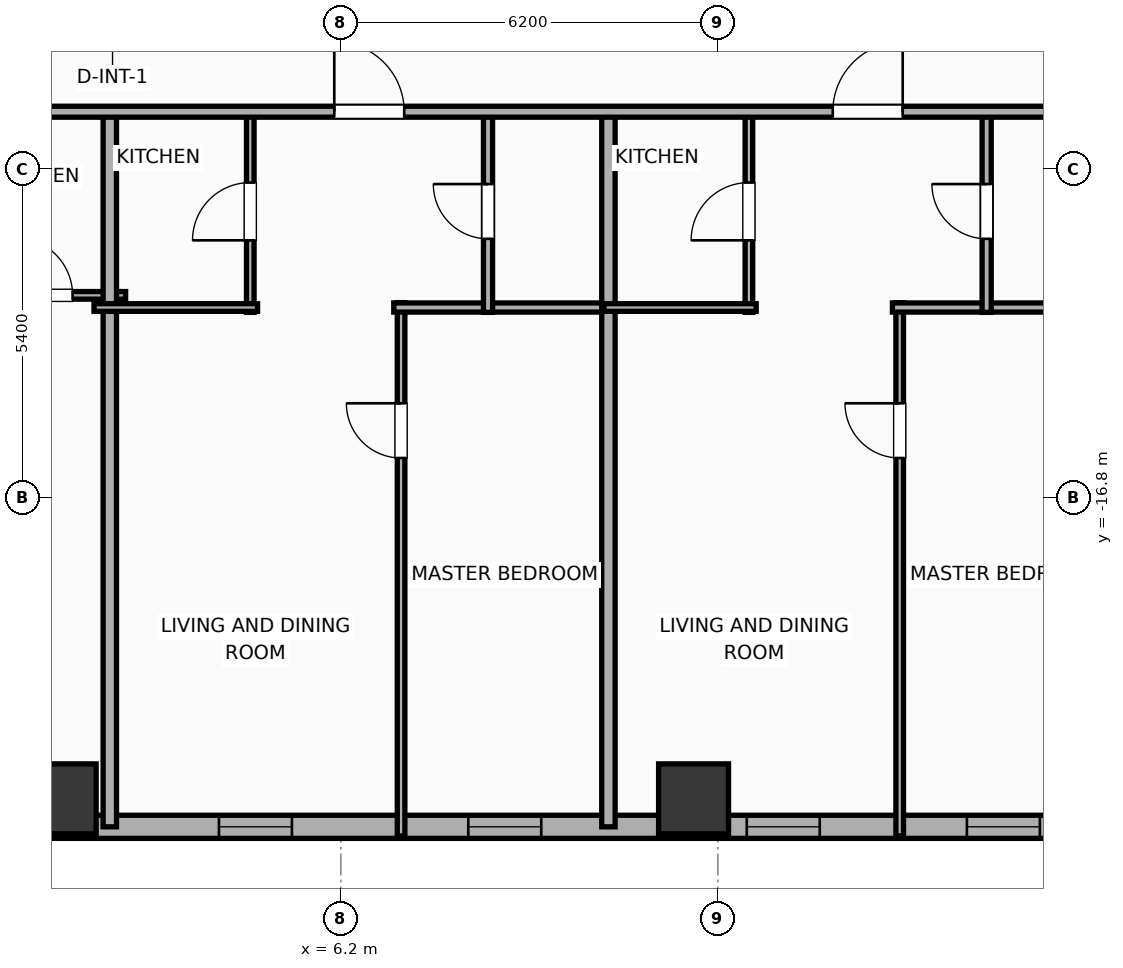
"""IFC4 building model, lengths in metres.
Left out: names, types, materials, properties, quantities, classifications, styles, units other than length and angle.
Written with IfcOpenShell. Run it as: python <this file> out.ifc"""

import sys

from ifc_helpers import new_model, si_unit, direction, frame, frame_2d, origin, origin_2d, place, context, subcontext, project, spatial, rectangle, hollow_rectangle, extrude, element, fill, save


model = new_model("IFC4")
c1 = context("Model", 3, precision=1e-05, world=origin(), true_north=direction((0.0, 1.0)))
c2 = subcontext(c1, "Body", "Model", "MODEL_VIEW")
j1 = project(units=[si_unit("LENGTHUNIT", "METRE"), si_unit("PLANEANGLEUNIT", "RADIAN")], contexts=[c1])
p1 = place(None, origin())
s1 = spatial("IfcSite", under=j1, at=p1, CompositionType="ELEMENT")
p2 = place(p1, origin())
s2 = spatial("IfcBuilding", under=s1, at=p2, CompositionType="ELEMENT")
p3 = place(p2, frame((0.0, 0.0, 72.8)))
s3 = spatial("IfcBuildingStorey", under=s2, at=p3, CompositionType="ELEMENT", Elevation=72.8)
for number, where, z_axis, x_axis in (
    (1, (1.6, -21.75, 0.0), (0.0, 0.0, 1.0), (1.0, 0.0, 0.0)),
    (2, (12.0, -21.75, 0.0), (0.0, 0.0, 1.0), (1.0, 0.0, 0.0)),
):
    element("IfcColumn", number, at=place(p3, frame(where, z_axis=z_axis, x_axis=x_axis)), inside=s3, PredefinedType="COLUMN", context=c2, shape_type="SweptSolid", body=[
        extrude(hollow_rectangle(XDim=1.15, YDim=1.15, WallThickness=0.04, at=origin_2d()), origin(), (0.0, 0.0, 1.0), 3.9),
    ])
p4 = place(p3, frame((22.381, -22.21, 0.0), z_axis=(0.0, 0.0, 1.0), x_axis=(-1.0, 0.0, 0.0)))
e3 = element("IfcWall", 3, at=p4, inside=s3, PredefinedType="ELEMENTEDWALL", context=c2, shape_type="SweptSolid", body=[
    extrude(rectangle(XDim=51.963, YDim=0.38, at=frame_2d((25.981, 0.0))), origin(), (0.0, 0.0, 1.0), 3.65),
])
p5 = place(p4, frame((50.372, 0.0, 0.75)))
e4 = element("IfcOpeningElement", 4, at=p5, cuts=e3, PredefinedType="OPENING", context=c2, shape_type="SweptSolid", body=[
    extrude(rectangle(XDim=0.52, YDim=2.05, at=frame_2d((0.26, 1.025))), frame((0.0, 0.2, 0.0), z_axis=(0.0, -1.0, 0.0), x_axis=(1.0, 0.0, 0.0)), (0.0, 0.0, 1.0), 0.4),
])
p6 = place(p4, frame((45.681, 0.0, 0.75)))
e5 = element("IfcOpeningElement", 5, at=p6, cuts=e3, PredefinedType="OPENING", context=c2, shape_type="SweptSolid", body=[
    extrude(rectangle(XDim=1.2, YDim=2.05, at=frame_2d((0.6, 1.025))), frame((0.0, 0.2, 0.0), z_axis=(0.0, -1.0, 0.0), x_axis=(1.0, 0.0, 0.0)), (0.0, 0.0, 1.0), 0.4),
])
p7 = place(p4, frame((48.485, 0.0, 0.75)))
e6 = element("IfcOpeningElement", 6, at=p7, cuts=e3, PredefinedType="OPENING", context=c2, shape_type="SweptSolid", body=[
    extrude(rectangle(XDim=1.2, YDim=2.05, at=frame_2d((0.6, 1.025))), frame((0.0, 0.2, 0.0), z_axis=(0.0, -1.0, 0.0), x_axis=(1.0, 0.0, 0.0)), (0.0, 0.0, 1.0), 0.4),
])
p8 = place(p4, frame((42.426, 0.0, 0.75)))
e7 = element("IfcOpeningElement", 7, at=p8, cuts=e3, PredefinedType="OPENING", context=c2, shape_type="SweptSolid", body=[
    extrude(rectangle(XDim=1.2, YDim=2.05, at=frame_2d((0.6, 1.025))), frame((0.0, 0.2, 0.0), z_axis=(0.0, -1.0, 0.0), x_axis=(1.0, 0.0, 0.0)), (0.0, 0.0, 1.0), 0.4),
])
p9 = place(p4, frame((37.486, 0.0, 0.75)))
e8 = element("IfcOpeningElement", 8, at=p9, cuts=e3, PredefinedType="OPENING", context=c2, shape_type="SweptSolid", body=[
    extrude(rectangle(XDim=1.2, YDim=2.05, at=frame_2d((0.6, 1.025))), frame((0.0, 0.2, 0.0), z_axis=(0.0, -1.0, 0.0), x_axis=(1.0, 0.0, 0.0)), (0.0, 0.0, 1.0), 0.4),
])
p10 = place(p4, frame((33.386, 0.0, 0.75)))
e9 = element("IfcOpeningElement", 9, at=p10, cuts=e3, PredefinedType="OPENING", context=c2, shape_type="SweptSolid", body=[
    extrude(rectangle(XDim=1.2, YDim=2.05, at=frame_2d((0.6, 1.025))), frame((0.0, 0.2, 0.0), z_axis=(0.0, -1.0, 0.0), x_axis=(1.0, 0.0, 0.0)), (0.0, 0.0, 1.0), 0.4),
])
p11 = place(p4, frame((29.166, 0.0, 0.75)))
e10 = element("IfcOpeningElement", 10, at=p11, cuts=e3, PredefinedType="OPENING", context=c2, shape_type="SweptSolid", body=[
    extrude(rectangle(XDim=1.2, YDim=2.05, at=frame_2d((0.6, 1.025))), frame((0.0, 0.2, 0.0), z_axis=(0.0, -1.0, 0.0), x_axis=(1.0, 0.0, 0.0)), (0.0, 0.0, 1.0), 0.4),
])
p12 = place(p4, frame((26.081, 0.0, 0.75)))
e11 = element("IfcOpeningElement", 11, at=p12, cuts=e3, PredefinedType="OPENING", context=c2, shape_type="SweptSolid", body=[
    extrude(rectangle(XDim=1.2, YDim=2.05, at=frame_2d((0.6, 1.025))), frame((0.0, 0.2, 0.0), z_axis=(0.0, -1.0, 0.0), x_axis=(1.0, 0.0, 0.0)), (0.0, 0.0, 1.0), 0.4),
])
p13 = place(p4, frame((21.981, 0.0, 0.75)))
e12 = element("IfcOpeningElement", 12, at=p13, cuts=e3, PredefinedType="OPENING", context=c2, shape_type="SweptSolid", body=[
    extrude(rectangle(XDim=1.2, YDim=2.05, at=frame_2d((0.6, 1.025))), frame((0.0, 0.2, 0.0), z_axis=(0.0, -1.0, 0.0), x_axis=(1.0, 0.0, 0.0)), (0.0, 0.0, 1.0), 0.4),
])
p14 = place(p4, frame((16.986, 0.0, 0.75)))
e13 = element("IfcOpeningElement", 13, at=p14, cuts=e3, PredefinedType="OPENING", context=c2, shape_type="SweptSolid", body=[
    extrude(rectangle(XDim=1.2, YDim=2.05, at=frame_2d((0.6, 1.025))), frame((0.0, 0.2, 0.0), z_axis=(0.0, -1.0, 0.0), x_axis=(1.0, 0.0, 0.0)), (0.0, 0.0, 1.0), 0.4),
])
p15 = place(p4, frame((12.886, 0.0, 0.75)))
e14 = element("IfcOpeningElement", 14, at=p15, cuts=e3, PredefinedType="OPENING", context=c2, shape_type="SweptSolid", body=[
    extrude(rectangle(XDim=1.2, YDim=2.05, at=frame_2d((0.6, 1.025))), frame((0.0, 0.2, 0.0), z_axis=(0.0, -1.0, 0.0), x_axis=(1.0, 0.0, 0.0)), (0.0, 0.0, 1.0), 0.4),
])
p16 = place(p4, frame((8.306, 0.0, 0.75)))
e15 = element("IfcOpeningElement", 15, at=p16, cuts=e3, PredefinedType="OPENING", context=c2, shape_type="SweptSolid", body=[
    extrude(rectangle(XDim=1.2, YDim=2.05, at=frame_2d((0.6, 1.025))), frame((0.0, 0.2, 0.0), z_axis=(0.0, -1.0, 0.0), x_axis=(1.0, 0.0, 0.0)), (0.0, 0.0, 1.0), 0.4),
])
p17 = place(p4, frame((4.686, 0.0, 0.75)))
e16 = element("IfcOpeningElement", 16, at=p17, cuts=e3, PredefinedType="OPENING", context=c2, shape_type="SweptSolid", body=[
    extrude(rectangle(XDim=1.2, YDim=2.05, at=frame_2d((0.6, 1.025))), frame((0.0, 0.2, 0.0), z_axis=(0.0, -1.0, 0.0), x_axis=(1.0, 0.0, 0.0)), (0.0, 0.0, 1.0), 0.4),
])
p18 = place(p4, frame((1.635, 0.0, 0.75)))
e17 = element("IfcOpeningElement", 17, at=p18, cuts=e3, PredefinedType="OPENING", context=c2, shape_type="SweptSolid", body=[
    extrude(rectangle(XDim=1.2, YDim=2.05, at=frame_2d((0.6, 1.025))), frame((0.0, 0.2, 0.0), z_axis=(0.0, -1.0, 0.0), x_axis=(1.0, 0.0, 0.0)), (0.0, 0.0, 1.0), 0.4),
])
p19 = place(p3, frame((-0.033, -13.47, 0.0), z_axis=(0.0, 0.0, 1.0), x_axis=(1.0, 0.0, 0.0)))
e18 = element("IfcWall", 18, at=p19, inside=s3, PredefinedType="PARTITIONING", context=c2, shape_type="SweptSolid", body=[
    extrude(rectangle(XDim=2.693, YDim=0.125, at=frame_2d((1.346, 0.0))), origin(), (0.0, 0.0, 1.0), 3.65),
])
p20 = place(p19, frame((0.872, 0.0, 0.0)))
e19 = element("IfcOpeningElement", 19, at=p20, cuts=e18, PredefinedType="OPENING", context=c2, shape_type="SweptSolid", body=[
    extrude(rectangle(XDim=0.95, YDim=2.05, at=frame_2d((0.475, 1.025))), frame((0.0, 0.073, 0.0), z_axis=(0.0, -1.0, 0.0), x_axis=(1.0, 0.0, 0.0)), (0.0, 0.0, 1.0), 0.145),
])
p21 = place(p3, frame((2.4, -22.21, 0.0), z_axis=(0.0, 0.0, 1.0), x_axis=(0.0, 1.0, 0.0)))
e20 = element("IfcWall", 20, at=p21, inside=s3, PredefinedType="PARTITIONING", context=c2, shape_type="SweptSolid", body=[
    extrude(rectangle(XDim=11.84, YDim=0.22, at=frame_2d((5.92, 0.0))), origin(), (0.0, 0.0, 1.0), 2.94),
])
p22 = place(p3, frame((7.19, -22.36, 0.0), z_axis=(0.0, 0.0, 1.0), x_axis=(0.0, 1.0, 0.0)))
e21 = element("IfcWall", 21, at=p22, inside=s3, PredefinedType="PARTITIONING", context=c2, shape_type="SweptSolid", body=[
    extrude(rectangle(XDim=8.77, YDim=0.125, at=frame_2d((4.385, 0.0))), origin(), (0.0, 0.0, 1.0), 3.65),
])
p23 = place(p22, frame((6.215, 0.0, 0.0)))
e22 = element("IfcOpeningElement", 22, at=p23, cuts=e21, PredefinedType="OPENING", context=c2, shape_type="SweptSolid", body=[
    extrude(rectangle(XDim=0.9, YDim=2.05, at=frame_2d((0.45, 1.025))), frame((0.0, 0.073, 0.0), z_axis=(0.0, -1.0, 0.0), x_axis=(1.0, 0.0, 0.0)), (0.0, 0.0, 1.0), 0.145),
])
p24 = place(p3, frame((7.07, -13.67, 0.0), z_axis=(0.0, 0.0, 1.0), x_axis=(1.0, 0.0, 0.0)))
e23 = element("IfcWall", 23, at=p24, inside=s3, PredefinedType="PLUMBINGWALL", context=c2, shape_type="SweptSolid", body=[
    extrude(rectangle(XDim=3.605, YDim=0.15, at=frame_2d((1.802, 0.0))), origin(), (0.0, 0.0, 1.0), 3.65),
])
p25 = place(p3, frame((4.71, -13.75, 0.0), z_axis=(0.0, 0.0, 1.0), x_axis=(0.0, 1.0, 0.0)))
e24 = element("IfcWall", 24, at=p25, inside=s3, PredefinedType="PARTITIONING", context=c2, shape_type="SweptSolid", body=[
    extrude(rectangle(XDim=3.32, YDim=0.125, at=frame_2d((1.66, 0.0))), origin(), (0.0, 0.0, 1.0), 3.65),
])
p26 = place(p25, frame((1.185, 0.0, 0.0)))
e25 = element("IfcOpeningElement", 25, at=p26, cuts=e24, PredefinedType="OPENING", context=c2, shape_type="SweptSolid", body=[
    extrude(rectangle(XDim=0.95, YDim=2.05, at=frame_2d((0.475, 1.025))), frame((0.0, 0.073, 0.0), z_axis=(0.0, -1.0, 0.0), x_axis=(1.0, 0.0, 0.0)), (0.0, 0.0, 1.0), 0.145),
])
p27 = place(p3, frame((2.14, -13.67, 0.0), z_axis=(0.0, 0.0, 1.0), x_axis=(1.0, 0.0, 0.0)))
e26 = element("IfcWall", 26, at=p27, inside=s3, PredefinedType="PARTITIONING", context=c2, shape_type="SweptSolid", body=[
    extrude(rectangle(XDim=2.69, YDim=0.125, at=frame_2d((1.345, 0.0))), origin(), (0.0, 0.0, 1.0), 3.65),
])
p28 = place(p3, frame((8.62, -13.75, 0.0), z_axis=(0.0, 0.0, 1.0), x_axis=(0.0, 1.0, 0.0)))
e27 = element("IfcWall", 27, at=p28, inside=s3, PredefinedType="PLUMBINGWALL", context=c2, shape_type="SweptSolid", body=[
    extrude(rectangle(XDim=3.32, YDim=0.15, at=frame_2d((1.66, 0.0))), origin(), (0.0, 0.0, 1.0), 3.65),
])
p29 = place(p28, frame((1.21, 0.0, 0.0)))
e28 = element("IfcOpeningElement", 28, at=p29, cuts=e27, PredefinedType="OPENING", context=c2, shape_type="SweptSolid", body=[
    extrude(rectangle(XDim=0.9, YDim=2.05, at=frame_2d((0.45, 1.025))), frame((0.0, 0.085, 0.0), z_axis=(0.0, -1.0, 0.0), x_axis=(1.0, 0.0, 0.0)), (0.0, 0.0, 1.0), 0.17),
])
p30 = place(p3, frame((10.6, -22.21, 0.0), z_axis=(0.0, 0.0, 1.0), x_axis=(0.0, 1.0, 0.0)))
e29 = element("IfcWall", 29, at=p30, inside=s3, PredefinedType="PARTITIONING", context=c2, shape_type="SweptSolid", body=[
    extrude(rectangle(XDim=11.84, YDim=0.22, at=frame_2d((5.92, 0.0))), origin(), (0.0, 0.0, 1.0), 3.65),
])
p31 = place(p3, frame((15.39, -22.36, 0.0), z_axis=(0.0, 0.0, 1.0), x_axis=(0.0, 1.0, 0.0)))
e30 = element("IfcWall", 30, at=p31, inside=s3, PredefinedType="PARTITIONING", context=c2, shape_type="SweptSolid", body=[
    extrude(rectangle(XDim=8.77, YDim=0.125, at=frame_2d((4.385, 0.0))), origin(), (0.0, 0.0, 1.0), 3.65),
])
p32 = place(p31, frame((6.215, 0.0, 0.0)))
e31 = element("IfcOpeningElement", 31, at=p32, cuts=e30, PredefinedType="OPENING", context=c2, shape_type="SweptSolid", body=[
    extrude(rectangle(XDim=0.9, YDim=2.05, at=frame_2d((0.45, 1.025))), frame((0.0, 0.073, 0.0), z_axis=(0.0, -1.0, 0.0), x_axis=(1.0, 0.0, 0.0)), (0.0, 0.0, 1.0), 0.145),
])
p33 = place(p3, frame((15.27, -13.67, 0.0), z_axis=(0.0, 0.0, 1.0), x_axis=(1.0, 0.0, 0.0)))
e32 = element("IfcWall", 32, at=p33, inside=s3, PredefinedType="PLUMBINGWALL", context=c2, shape_type="SweptSolid", body=[
    extrude(rectangle(XDim=3.605, YDim=0.15, at=frame_2d((1.802, 0.0))), origin(), (0.0, 0.0, 1.0), 3.65),
])
p34 = place(p3, frame((12.91, -13.75, 0.0), z_axis=(0.0, 0.0, 1.0), x_axis=(0.0, 1.0, 0.0)))
e33 = element("IfcWall", 33, at=p34, inside=s3, PredefinedType="PARTITIONING", context=c2, shape_type="SweptSolid", body=[
    extrude(rectangle(XDim=3.32, YDim=0.125, at=frame_2d((1.66, 0.0))), origin(), (0.0, 0.0, 1.0), 3.65),
])
p35 = place(p34, frame((1.185, 0.0, 0.0)))
e34 = element("IfcOpeningElement", 34, at=p35, cuts=e33, PredefinedType="OPENING", context=c2, shape_type="SweptSolid", body=[
    extrude(rectangle(XDim=0.95, YDim=2.05, at=frame_2d((0.475, 1.025))), frame((0.0, 0.073, 0.0), z_axis=(0.0, -1.0, 0.0), x_axis=(1.0, 0.0, 0.0)), (0.0, 0.0, 1.0), 0.145),
])
p36 = place(p3, frame((10.525, -13.67, 0.0), z_axis=(0.0, 0.0, 1.0), x_axis=(1.0, 0.0, 0.0)))
e35 = element("IfcWall", 35, at=p36, inside=s3, PredefinedType="PARTITIONING", context=c2, shape_type="SweptSolid", body=[
    extrude(rectangle(XDim=2.505, YDim=0.125, at=frame_2d((1.252, 0.0))), origin(), (0.0, 0.0, 1.0), 3.65),
])
p37 = place(p3, frame((16.82, -13.75, 0.0), z_axis=(0.0, 0.0, 1.0), x_axis=(0.0, 1.0, 0.0)))
e36 = element("IfcWall", 36, at=p37, inside=s3, PredefinedType="PLUMBINGWALL", context=c2, shape_type="SweptSolid", body=[
    extrude(rectangle(XDim=3.32, YDim=0.15, at=frame_2d((1.66, 0.0))), origin(), (0.0, 0.0, 1.0), 3.65),
])
p38 = place(p37, frame((1.21, 0.0, 0.0)))
e37 = element("IfcOpeningElement", 37, at=p38, cuts=e36, PredefinedType="OPENING", context=c2, shape_type="SweptSolid", body=[
    extrude(rectangle(XDim=0.9, YDim=2.05, at=frame_2d((0.45, 1.025))), frame((0.0, 0.085, 0.0), z_axis=(0.0, -1.0, 0.0), x_axis=(1.0, 0.0, 0.0)), (0.0, 0.0, 1.0), 0.17),
])
p39 = place(p3, frame((-33.41, -10.45, 0.0), z_axis=(0.0, 0.0, 1.0), x_axis=(1.0, 0.0, 0.0)))
e38 = element("IfcWall", 38, at=p39, inside=s3, PredefinedType="PARTITIONING", context=c2, shape_type="SweptSolid", body=[
    extrude(rectangle(XDim=59.62, YDim=0.18, at=frame_2d((29.81, 0.0))), origin(), (0.0, 0.0, 1.0), 3.65),
])
p40 = place(p39, frame((2.495, 0.0, 0.0)))
e39 = element("IfcOpeningElement", 39, at=p40, cuts=e38, PredefinedType="OPENING", context=c2, shape_type="SweptSolid", body=[
    extrude(rectangle(XDim=0.9, YDim=2.05, at=frame_2d((0.45, 1.025))), frame((0.0, 0.1, 0.0), z_axis=(0.0, -1.0, 0.0), x_axis=(1.0, 0.0, 0.0)), (0.0, 0.0, 1.0), 0.2),
])
p41 = place(p39, frame((8.905, 0.0, 0.0)))
e40 = element("IfcOpeningElement", 40, at=p41, cuts=e38, PredefinedType="OPENING", context=c2, shape_type="SweptSolid", body=[
    extrude(rectangle(XDim=1.15, YDim=2.05, at=frame_2d((0.575, 1.025))), frame((0.0, 0.1, 0.0), z_axis=(0.0, -1.0, 0.0), x_axis=(1.0, 0.0, 0.0)), (0.0, 0.0, 1.0), 0.2),
])
p42 = place(p39, frame((14.902, 0.0, 0.0)))
e41 = element("IfcOpeningElement", 41, at=p42, cuts=e38, PredefinedType="OPENING", context=c2, shape_type="SweptSolid", body=[
    extrude(rectangle(XDim=1.15, YDim=2.05, at=frame_2d((0.575, 1.025))), frame((0.0, 0.1, 0.0), z_axis=(0.0, -1.0, 0.0), x_axis=(1.0, 0.0, 0.0)), (0.0, 0.0, 1.0), 0.2),
])
p43 = place(p39, frame((23.112, 0.0, 0.0)))
e42 = element("IfcOpeningElement", 42, at=p43, cuts=e38, PredefinedType="OPENING", context=c2, shape_type="SweptSolid", body=[
    extrude(rectangle(XDim=1.15, YDim=2.05, at=frame_2d((0.575, 1.025))), frame((0.0, 0.1, 0.0), z_axis=(0.0, -1.0, 0.0), x_axis=(1.0, 0.0, 0.0)), (0.0, 0.0, 1.0), 0.2),
])
p44 = place(p39, frame((31.572, 0.0, 0.0)))
e43 = element("IfcOpeningElement", 43, at=p44, cuts=e38, PredefinedType="OPENING", context=c2, shape_type="SweptSolid", body=[
    extrude(rectangle(XDim=0.9, YDim=2.05, at=frame_2d((0.45, 1.025))), frame((0.0, 0.1, 0.0), z_axis=(0.0, -1.0, 0.0), x_axis=(1.0, 0.0, 0.0)), (0.0, 0.0, 1.0), 0.2),
])
p45 = place(p39, frame((39.502, 0.0, 0.0)))
e44 = element("IfcOpeningElement", 44, at=p45, cuts=e38, PredefinedType="OPENING", context=c2, shape_type="SweptSolid", body=[
    extrude(rectangle(XDim=1.15, YDim=2.05, at=frame_2d((0.575, 1.025))), frame((0.0, 0.1, 0.0), z_axis=(0.0, -1.0, 0.0), x_axis=(1.0, 0.0, 0.0)), (0.0, 0.0, 1.0), 0.2),
])
p46 = place(p39, frame((47.699, 0.0, 0.0)))
e45 = element("IfcOpeningElement", 45, at=p46, cuts=e38, PredefinedType="OPENING", context=c2, shape_type="SweptSolid", body=[
    extrude(rectangle(XDim=1.15, YDim=2.05, at=frame_2d((0.575, 1.025))), frame((0.0, 0.1, 0.0), z_axis=(0.0, -1.0, 0.0), x_axis=(1.0, 0.0, 0.0)), (0.0, 0.0, 1.0), 0.2),
])
p47 = place(p39, frame((55.539, 0.0, 0.0)))
e46 = element("IfcOpeningElement", 46, at=p47, cuts=e38, PredefinedType="OPENING", context=c2, shape_type="SweptSolid", body=[
    extrude(rectangle(XDim=1.15, YDim=2.05, at=frame_2d((0.575, 1.025))), frame((0.0, 0.1, 0.0), z_axis=(0.0, -1.0, 0.0), x_axis=(1.0, 0.0, 0.0)), (0.0, 0.0, 1.0), 0.2),
])
p48 = place(p14, origin())
e47 = element("IfcWindow", 47, at=p48, inside=s3, PartitioningType="SINGLE_PANEL", PredefinedType="WINDOW", context=c2, shape_type="SweptSolid", body=[
    extrude(rectangle(XDim=1.2, YDim=2.05, at=frame_2d((0.6, 1.025))), frame((0.0, 0.03, 0.0), z_axis=(0.0, -1.0, 0.0), x_axis=(1.0, 0.0, 0.0)), (0.0, 0.0, 1.0), 0.06),
])
fill(e13, e47)
p49 = place(p15, origin())
e48 = element("IfcWindow", 48, at=p49, inside=s3, PartitioningType="SINGLE_PANEL", PredefinedType="WINDOW", context=c2, shape_type="SweptSolid", body=[
    extrude(rectangle(XDim=1.2, YDim=2.05, at=frame_2d((0.6, 1.025))), frame((0.0, 0.03, 0.0), z_axis=(0.0, -1.0, 0.0), x_axis=(1.0, 0.0, 0.0)), (0.0, 0.0, 1.0), 0.06),
])
fill(e14, e48)
p50 = place(p16, origin())
e49 = element("IfcWindow", 49, at=p50, inside=s3, PartitioningType="SINGLE_PANEL", PredefinedType="WINDOW", context=c2, shape_type="SweptSolid", body=[
    extrude(rectangle(XDim=1.2, YDim=2.05, at=frame_2d((0.6, 1.025))), frame((0.0, 0.03, 0.0), z_axis=(0.0, -1.0, 0.0), x_axis=(1.0, 0.0, 0.0)), (0.0, 0.0, 1.0), 0.06),
])
fill(e15, e49)
p51 = place(p17, origin())
e50 = element("IfcWindow", 50, at=p51, inside=s3, PartitioningType="SINGLE_PANEL", PredefinedType="WINDOW", context=c2, shape_type="SweptSolid", body=[
    extrude(rectangle(XDim=1.2, YDim=2.05, at=frame_2d((0.6, 1.025))), frame((0.0, 0.03, 0.0), z_axis=(0.0, -1.0, 0.0), x_axis=(1.0, 0.0, 0.0)), (0.0, 0.0, 1.0), 0.06),
])
fill(e16, e50)
p52 = place(p20, origin())
e51 = element("IfcDoor", 51, at=p52, inside=s3, OperationType="SINGLE_SWING_LEFT", PredefinedType="DOOR", context=c2, shape_type="SweptSolid", body=[
    extrude(rectangle(XDim=0.95, YDim=2.05, at=frame_2d((0.475, 1.025))), frame((0.0, 0.025, 0.0), z_axis=(0.0, -1.0, 0.0), x_axis=(1.0, 0.0, 0.0)), (0.0, 0.0, 1.0), 0.05),
])
fill(e19, e51)
p53 = place(p23, origin())
e52 = element("IfcDoor", 52, at=p53, inside=s3, OperationType="SINGLE_SWING_RIGHT", PredefinedType="DOOR", context=c2, shape_type="SweptSolid", body=[
    extrude(rectangle(XDim=0.9, YDim=2.05, at=frame_2d((0.45, 1.025))), frame((0.0, 0.025, 0.0), z_axis=(0.0, -1.0, 0.0), x_axis=(1.0, 0.0, 0.0)), (0.0, 0.0, 1.0), 0.05),
])
fill(e22, e52)
p54 = place(p26, origin())
e53 = element("IfcDoor", 53, at=p54, inside=s3, OperationType="SINGLE_SWING_LEFT", PredefinedType="DOOR", context=c2, shape_type="SweptSolid", body=[
    extrude(rectangle(XDim=0.95, YDim=2.05, at=frame_2d((0.475, 1.025))), frame((0.0, 0.025, 0.0), z_axis=(0.0, -1.0, 0.0), x_axis=(1.0, 0.0, 0.0)), (0.0, 0.0, 1.0), 0.05),
])
fill(e25, e53)
p55 = place(p29, origin())
e54 = element("IfcDoor", 54, at=p55, inside=s3, OperationType="SINGLE_SWING_RIGHT", PredefinedType="DOOR", context=c2, shape_type="SweptSolid", body=[
    extrude(rectangle(XDim=0.9, YDim=2.05, at=frame_2d((0.45, 1.025))), frame((0.0, 0.025, 0.0), z_axis=(0.0, -1.0, 0.0), x_axis=(1.0, 0.0, 0.0)), (0.0, 0.0, 1.0), 0.05),
])
fill(e28, e54)
p56 = place(p32, origin())
e55 = element("IfcDoor", 55, at=p56, inside=s3, OperationType="SINGLE_SWING_RIGHT", PredefinedType="DOOR", context=c2, shape_type="SweptSolid", body=[
    extrude(rectangle(XDim=0.9, YDim=2.05, at=frame_2d((0.45, 1.025))), frame((0.0, 0.025, 0.0), z_axis=(0.0, -1.0, 0.0), x_axis=(1.0, 0.0, 0.0)), (0.0, 0.0, 1.0), 0.05),
])
fill(e31, e55)
p57 = place(p35, origin())
e56 = element("IfcDoor", 56, at=p57, inside=s3, OperationType="SINGLE_SWING_LEFT", PredefinedType="DOOR", context=c2, shape_type="SweptSolid", body=[
    extrude(rectangle(XDim=0.95, YDim=2.05, at=frame_2d((0.475, 1.025))), frame((0.0, 0.025, 0.0), z_axis=(0.0, -1.0, 0.0), x_axis=(1.0, 0.0, 0.0)), (0.0, 0.0, 1.0), 0.05),
])
fill(e34, e56)
p58 = place(p38, origin())
e57 = element("IfcDoor", 57, at=p58, inside=s3, OperationType="SINGLE_SWING_RIGHT", PredefinedType="DOOR", context=c2, shape_type="SweptSolid", body=[
    extrude(rectangle(XDim=0.9, YDim=2.05, at=frame_2d((0.45, 1.025))), frame((0.0, 0.025, 0.0), z_axis=(0.0, -1.0, 0.0), x_axis=(1.0, 0.0, 0.0)), (0.0, 0.0, 1.0), 0.05),
])
fill(e37, e57)
p59 = place(p45, origin())
e58 = element("IfcDoor", 58, at=p59, inside=s3, OperationType="SINGLE_SWING_LEFT", PredefinedType="DOOR", context=c2, shape_type="SweptSolid", body=[
    extrude(rectangle(XDim=1.15, YDim=2.05, at=frame_2d((0.575, 1.025))), frame((0.0, 0.025, 0.0), z_axis=(0.0, -1.0, 0.0), x_axis=(1.0, 0.0, 0.0)), (0.0, 0.0, 1.0), 0.05),
])
fill(e44, e58)
p60 = place(p46, origin())
e59 = element("IfcDoor", 59, at=p60, inside=s3, OperationType="SINGLE_SWING_RIGHT", PredefinedType="DOOR", context=c2, shape_type="SweptSolid", body=[
    extrude(rectangle(XDim=1.15, YDim=2.05, at=frame_2d((0.575, 1.025))), frame((0.0, 0.025, 0.0), z_axis=(0.0, -1.0, 0.0), x_axis=(1.0, 0.0, 0.0)), (0.0, 0.0, 1.0), 0.05),
])
fill(e45, e59)
save(model, sys.argv[1])
